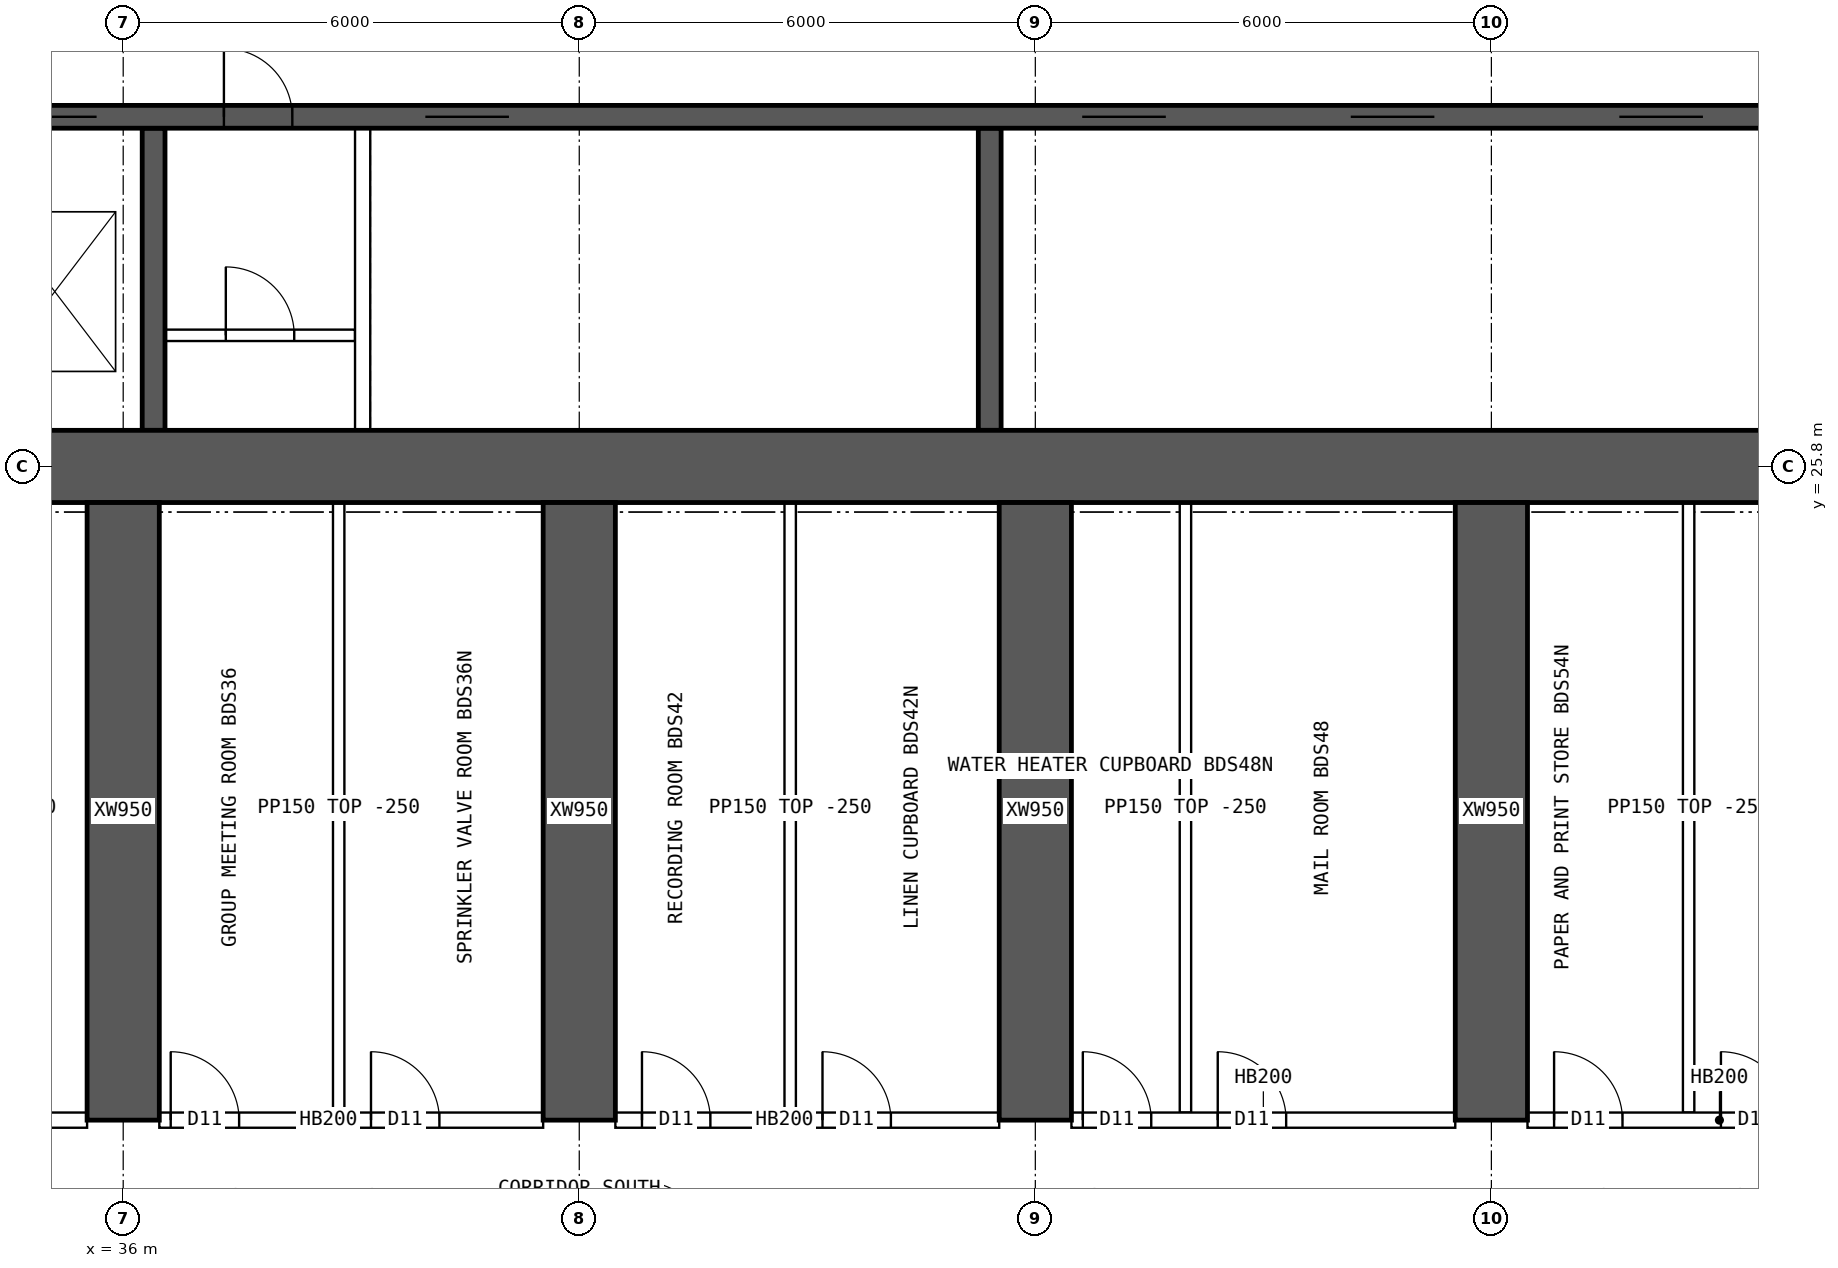
"""IFC4 building model, lengths in metres.
Left out: names, types, materials, properties, quantities, classifications, styles, units other than length and angle.
Written with IfcOpenShell. Run it as: python <this file> out.ifc"""

import sys

from ifc_helpers import new_model, si_unit, direction, frame, frame_2d, origin, place, context, subcontext, project, spatial, rectangle, extrude, element, fill, save


model = new_model("IFC4")
c1 = context("Model", 3, precision=1e-05, world=origin(), true_north=direction((0.0, 1.0)))
c2 = subcontext(c1, "Body", "Model", "MODEL_VIEW")
j1 = project(units=[si_unit("LENGTHUNIT", "METRE"), si_unit("PLANEANGLEUNIT", "RADIAN")], contexts=[c1])
p1 = place(None, origin())
s1 = spatial("IfcSite", under=j1, at=p1, CompositionType="ELEMENT")
p2 = place(p1, origin())
s2 = spatial("IfcBuilding", under=s1, at=p2, CompositionType="ELEMENT")
p3 = place(p2, frame((0.0, 0.0, 140.35)))
s3 = spatial("IfcBuildingStorey", under=s2, at=p3, CompositionType="ELEMENT", Elevation=140.35)
p4 = place(p3, frame((18.0, 25.8, 0.0), z_axis=(0.0, 0.0, 1.0), x_axis=(1.0, 0.0, 0.0)))
e1 = element("IfcWall", 1, at=p4, inside=s3, PredefinedType="SHEAR", context=c2, shape_type="SweptSolid", body=[
    extrude(rectangle(XDim=48.0, YDim=0.95, at=frame_2d((24.0, 0.0))), origin(), (0.0, 0.0, 1.0), 4.5),
])
p5 = place(p3, frame((18.475, 30.4, 0.0), z_axis=(0.0, 0.0, 1.0), x_axis=(1.0, 0.0, 0.0)))
e2 = element("IfcWall", 2, at=p5, inside=s3, PredefinedType="SHEAR", context=c2, shape_type="SweptSolid", body=[
    extrude(rectangle(XDim=47.05, YDim=0.3, at=frame_2d((23.525, 0.0))), origin(), (0.0, 0.0, 1.0), 4.5),
])
p6 = place(p5, frame((0.4, 0.0, 0.0)))
e3 = element("IfcOpeningElement", 3, at=p6, cuts=e2, PredefinedType="OPENING", context=c2, shape_type="SweptSolid", body=[
    extrude(rectangle(XDim=1.0, YDim=2.1, at=frame_2d((0.5, 1.05))), frame((0.0, 0.16, 0.0), z_axis=(0.0, -1.0, 0.0), x_axis=(1.0, 0.0, 0.0)), (0.0, 0.0, 1.0), 0.32),
])
p7 = place(p5, frame((45.65, 0.0, 0.0)))
e4 = element("IfcOpeningElement", 4, at=p7, cuts=e2, PredefinedType="OPENING", context=c2, shape_type="SweptSolid", body=[
    extrude(rectangle(XDim=1.0, YDim=2.1, at=frame_2d((0.5, 1.05))), frame((0.0, 0.16, 0.0), z_axis=(0.0, -1.0, 0.0), x_axis=(1.0, 0.0, 0.0)), (0.0, 0.0, 1.0), 0.32),
])
p8 = place(p5, frame((8.275, 0.0, 0.0)))
e5 = element("IfcOpeningElement", 5, at=p8, cuts=e2, PredefinedType="OPENING", context=c2, shape_type="SweptSolid", body=[
    extrude(rectangle(XDim=1.1, YDim=2.1, at=frame_2d((0.55, 1.05))), frame((0.0, 0.16, 0.0), z_axis=(0.0, -1.0, 0.0), x_axis=(1.0, 0.0, 0.0)), (0.0, 0.0, 1.0), 0.32),
])
p9 = place(p5, frame((10.875, 0.0, 0.0)))
e6 = element("IfcOpeningElement", 6, at=p9, cuts=e2, PredefinedType="OPENING", context=c2, shape_type="SweptSolid", body=[
    extrude(rectangle(XDim=1.1, YDim=2.1, at=frame_2d((0.55, 1.05))), frame((0.0, 0.16, 0.0), z_axis=(0.0, -1.0, 0.0), x_axis=(1.0, 0.0, 0.0)), (0.0, 0.0, 1.0), 0.32),
])
p10 = place(p5, frame((13.475, 0.0, 0.0)))
e7 = element("IfcOpeningElement", 7, at=p10, cuts=e2, PredefinedType="OPENING", context=c2, shape_type="SweptSolid", body=[
    extrude(rectangle(XDim=1.1, YDim=2.1, at=frame_2d((0.55, 1.05))), frame((0.0, 0.16, 0.0), z_axis=(0.0, -1.0, 0.0), x_axis=(1.0, 0.0, 0.0)), (0.0, 0.0, 1.0), 0.32),
])
p11 = place(p5, frame((16.075, 0.0, 0.0)))
e8 = element("IfcOpeningElement", 8, at=p11, cuts=e2, PredefinedType="OPENING", context=c2, shape_type="SweptSolid", body=[
    extrude(rectangle(XDim=1.1, YDim=2.1, at=frame_2d((0.55, 1.05))), frame((0.0, 0.16, 0.0), z_axis=(0.0, -1.0, 0.0), x_axis=(1.0, 0.0, 0.0)), (0.0, 0.0, 1.0), 0.32),
])
p12 = place(p5, frame((18.85, 0.0, 0.0)))
e9 = element("IfcOpeningElement", 9, at=p12, cuts=e2, PredefinedType="OPENING", context=c2, shape_type="SweptSolid", body=[
    extrude(rectangle(XDim=0.9, YDim=2.1, at=frame_2d((0.45, 1.05))), frame((0.0, 0.16, 0.0), z_axis=(0.0, -1.0, 0.0), x_axis=(1.0, 0.0, 0.0)), (0.0, 0.0, 1.0), 0.32),
])
p13 = place(p5, frame((21.5, 0.0, 0.0)))
e10 = element("IfcOpeningElement", 10, at=p13, cuts=e2, PredefinedType="OPENING", context=c2, shape_type="SweptSolid", body=[
    extrude(rectangle(XDim=1.1, YDim=2.1, at=frame_2d((0.55, 1.05))), frame((0.0, 0.16, 0.0), z_axis=(0.0, -1.0, 0.0), x_axis=(1.0, 0.0, 0.0)), (0.0, 0.0, 1.0), 0.32),
])
p14 = place(p5, frame((30.142, 0.0, 0.0)))
e11 = element("IfcOpeningElement", 11, at=p14, cuts=e2, PredefinedType="OPENING", context=c2, shape_type="SweptSolid", body=[
    extrude(rectangle(XDim=1.1, YDim=2.1, at=frame_2d((0.55, 1.05))), frame((0.0, 0.16, 0.0), z_axis=(0.0, -1.0, 0.0), x_axis=(1.0, 0.0, 0.0)), (0.0, 0.0, 1.0), 0.32),
])
p15 = place(p5, frame((33.675, 0.0, 0.0)))
e12 = element("IfcOpeningElement", 12, at=p15, cuts=e2, PredefinedType="OPENING", context=c2, shape_type="SweptSolid", body=[
    extrude(rectangle(XDim=1.1, YDim=2.1, at=frame_2d((0.55, 1.05))), frame((0.0, 0.16, 0.0), z_axis=(0.0, -1.0, 0.0), x_axis=(1.0, 0.0, 0.0)), (0.0, 0.0, 1.0), 0.32),
])
p16 = place(p5, frame((37.208, 0.0, 0.0)))
e13 = element("IfcOpeningElement", 13, at=p16, cuts=e2, PredefinedType="OPENING", context=c2, shape_type="SweptSolid", body=[
    extrude(rectangle(XDim=1.1, YDim=2.1, at=frame_2d((0.55, 1.05))), frame((0.0, 0.16, 0.0), z_axis=(0.0, -1.0, 0.0), x_axis=(1.0, 0.0, 0.0)), (0.0, 0.0, 1.0), 0.32),
])
for number, where, z_axis, x_axis in (
    (14, (36.4, 26.275, 0.0), (0.0, 0.0, 1.0), (0.0, 1.0, 0.0)),
    (15, (47.4, 26.275, 0.0), (0.0, 0.0, 1.0), (0.0, 1.0, 0.0)),
):
    element("IfcWall", number, at=place(p3, frame(where, z_axis=z_axis, x_axis=x_axis)), inside=s3, PredefinedType="SHEAR", context=c2, shape_type="SweptSolid", body=[
        extrude(rectangle(XDim=3.975, YDim=0.3, at=frame_2d((1.988, 0.0))), origin(), (0.0, 0.0, 1.0), 4.5),
    ])
for number, where, z_axis, x_axis in (
    (16, (36.0, 17.2, 0.0), (0.0, 0.0, 1.0), (0.0, 1.0, 0.0)),
    (17, (42.0, 17.2, 0.0), (0.0, 0.0, 1.0), (0.0, 1.0, 0.0)),
    (18, (48.0, 17.2, 0.0), (0.0, 0.0, 1.0), (0.0, 1.0, 0.0)),
    (19, (54.0, 17.2, 0.0), (0.0, 0.0, 1.0), (0.0, 1.0, 0.0)),
):
    element("IfcWall", number, at=place(p3, frame(where, z_axis=z_axis, x_axis=x_axis)), inside=s3, PredefinedType="SHEAR", context=c2, shape_type="SweptSolid", body=[
        extrude(rectangle(XDim=8.125, YDim=0.95, at=frame_2d((4.062, 0.0))), origin(), (0.0, 0.0, 1.0), 4.5),
    ])
p17 = place(p3, frame((36.55, 27.525, 0.0), z_axis=(0.0, 0.0, 1.0), x_axis=(1.0, 0.0, 0.0)))
e20 = element("IfcWall", 20, at=p17, inside=s3, PredefinedType="SOLIDWALL", context=c2, shape_type="SweptSolid", body=[
    extrude(rectangle(XDim=2.5, YDim=0.15, at=frame_2d((1.25, 0.0))), origin(), (0.0, 0.0, 1.0), 4.25),
])
p18 = place(p17, frame((0.8, 0.0, 0.0)))
e21 = element("IfcOpeningElement", 21, at=p18, cuts=e20, PredefinedType="OPENING", context=c2, shape_type="SweptSolid", body=[
    extrude(rectangle(XDim=0.9, YDim=2.1, at=frame_2d((0.45, 1.05))), frame((0.0, 0.085, 0.0), z_axis=(0.0, -1.0, 0.0), x_axis=(1.0, 0.0, 0.0)), (0.0, 0.0, 1.0), 0.17),
])
p19 = place(p3, frame((39.15, 26.275, 0.0), z_axis=(0.0, 0.0, 1.0), x_axis=(0.0, 1.0, 0.0)))
e22 = element("IfcWall", 22, at=p19, inside=s3, PredefinedType="SOLIDWALL", context=c2, shape_type="SweptSolid", body=[
    extrude(rectangle(XDim=3.975, YDim=0.2, at=frame_2d((1.988, 0.0))), origin(), (0.0, 0.0, 1.0), 4.25),
])
p20 = place(p3, frame((30.475, 17.2, 0.0), z_axis=(0.0, 0.0, 1.0), x_axis=(1.0, 0.0, 0.0)))
e23 = element("IfcWall", 23, at=p20, inside=s3, PredefinedType="SOLIDWALL", context=c2, shape_type="SweptSolid", body=[
    extrude(rectangle(XDim=5.05, YDim=0.2, at=frame_2d((2.525, 0.0))), origin(), (0.0, 0.0, 1.0), 4.25),
])
p21 = place(p20, frame((0.8, 0.0, 0.0)))
e24 = element("IfcOpeningElement", 24, at=p21, cuts=e23, PredefinedType="OPENING", context=c2, shape_type="SweptSolid", body=[
    extrude(rectangle(XDim=1.0, YDim=2.1, at=frame_2d((0.5, 1.05))), frame((0.0, 0.11, 0.0), z_axis=(0.0, -1.0, 0.0), x_axis=(1.0, 0.0, 0.0)), (0.0, 0.0, 1.0), 0.22),
])
p22 = place(p3, frame((36.475, 17.2, 0.0), z_axis=(0.0, 0.0, 1.0), x_axis=(1.0, 0.0, 0.0)))
e25 = element("IfcWall", 25, at=p22, inside=s3, PredefinedType="SOLIDWALL", context=c2, shape_type="SweptSolid", body=[
    extrude(rectangle(XDim=5.05, YDim=0.2, at=frame_2d((2.525, 0.0))), origin(), (0.0, 0.0, 1.0), 4.25),
])
p23 = place(p22, frame((0.15, 0.0, 0.0)))
e26 = element("IfcOpeningElement", 26, at=p23, cuts=e25, PredefinedType="OPENING", context=c2, shape_type="SweptSolid", body=[
    extrude(rectangle(XDim=0.9, YDim=2.1, at=frame_2d((0.45, 1.05))), frame((0.0, 0.11, 0.0), z_axis=(0.0, -1.0, 0.0), x_axis=(1.0, 0.0, 0.0)), (0.0, 0.0, 1.0), 0.22),
])
p24 = place(p22, frame((2.785, 0.0, 0.0)))
e27 = element("IfcOpeningElement", 27, at=p24, cuts=e25, PredefinedType="OPENING", context=c2, shape_type="SweptSolid", body=[
    extrude(rectangle(XDim=0.9, YDim=2.1, at=frame_2d((0.45, 1.05))), frame((0.0, 0.11, 0.0), z_axis=(0.0, -1.0, 0.0), x_axis=(1.0, 0.0, 0.0)), (0.0, 0.0, 1.0), 0.22),
])
p25 = place(p3, frame((42.475, 17.2, 0.0), z_axis=(0.0, 0.0, 1.0), x_axis=(1.0, 0.0, 0.0)))
e28 = element("IfcWall", 28, at=p25, inside=s3, PredefinedType="SOLIDWALL", context=c2, shape_type="SweptSolid", body=[
    extrude(rectangle(XDim=5.05, YDim=0.2, at=frame_2d((2.525, 0.0))), origin(), (0.0, 0.0, 1.0), 4.25),
])
p26 = place(p25, frame((0.35, 0.0, 0.0)))
e29 = element("IfcOpeningElement", 29, at=p26, cuts=e28, PredefinedType="OPENING", context=c2, shape_type="SweptSolid", body=[
    extrude(rectangle(XDim=0.9, YDim=2.1, at=frame_2d((0.45, 1.05))), frame((0.0, 0.11, 0.0), z_axis=(0.0, -1.0, 0.0), x_axis=(1.0, 0.0, 0.0)), (0.0, 0.0, 1.0), 0.22),
])
p27 = place(p25, frame((2.725, 0.0, 0.0)))
e30 = element("IfcOpeningElement", 30, at=p27, cuts=e28, PredefinedType="OPENING", context=c2, shape_type="SweptSolid", body=[
    extrude(rectangle(XDim=0.9, YDim=2.1, at=frame_2d((0.45, 1.05))), frame((0.0, 0.11, 0.0), z_axis=(0.0, -1.0, 0.0), x_axis=(1.0, 0.0, 0.0)), (0.0, 0.0, 1.0), 0.22),
])
p28 = place(p3, frame((48.475, 17.2, 0.0), z_axis=(0.0, 0.0, 1.0), x_axis=(1.0, 0.0, 0.0)))
e31 = element("IfcWall", 31, at=p28, inside=s3, PredefinedType="SOLIDWALL", context=c2, shape_type="SweptSolid", body=[
    extrude(rectangle(XDim=5.05, YDim=0.2, at=frame_2d((2.525, 0.0))), origin(), (0.0, 0.0, 1.0), 4.25),
])
p29 = place(p28, frame((0.15, 0.0, 0.0)))
e32 = element("IfcOpeningElement", 32, at=p29, cuts=e31, PredefinedType="OPENING", context=c2, shape_type="SweptSolid", body=[
    extrude(rectangle(XDim=0.9, YDim=2.1, at=frame_2d((0.45, 1.05))), frame((0.0, 0.11, 0.0), z_axis=(0.0, -1.0, 0.0), x_axis=(1.0, 0.0, 0.0)), (0.0, 0.0, 1.0), 0.22),
])
p30 = place(p28, frame((1.925, 0.0, 0.0)))
e33 = element("IfcOpeningElement", 33, at=p30, cuts=e31, PredefinedType="OPENING", context=c2, shape_type="SweptSolid", body=[
    extrude(rectangle(XDim=0.9, YDim=2.1, at=frame_2d((0.45, 1.05))), frame((0.0, 0.11, 0.0), z_axis=(0.0, -1.0, 0.0), x_axis=(1.0, 0.0, 0.0)), (0.0, 0.0, 1.0), 0.22),
])
p31 = place(p3, frame((54.475, 17.2, 0.0), z_axis=(0.0, 0.0, 1.0), x_axis=(1.0, 0.0, 0.0)))
e34 = element("IfcWall", 34, at=p31, inside=s3, PredefinedType="SOLIDWALL", context=c2, shape_type="SweptSolid", body=[
    extrude(rectangle(XDim=5.05, YDim=0.2, at=frame_2d((2.525, 0.0))), origin(), (0.0, 0.0, 1.0), 4.25),
])
p32 = place(p31, frame((0.35, 0.0, 0.0)))
e35 = element("IfcOpeningElement", 35, at=p32, cuts=e34, PredefinedType="OPENING", context=c2, shape_type="SweptSolid", body=[
    extrude(rectangle(XDim=0.9, YDim=2.1, at=frame_2d((0.45, 1.05))), frame((0.0, 0.11, 0.0), z_axis=(0.0, -1.0, 0.0), x_axis=(1.0, 0.0, 0.0)), (0.0, 0.0, 1.0), 0.22),
])
p33 = place(p31, frame((2.545, 0.0, 0.0)))
e36 = element("IfcOpeningElement", 36, at=p33, cuts=e34, PredefinedType="OPENING", context=c2, shape_type="SweptSolid", body=[
    extrude(rectangle(XDim=0.9, YDim=2.1, at=frame_2d((0.45, 1.05))), frame((0.0, 0.11, 0.0), z_axis=(0.0, -1.0, 0.0), x_axis=(1.0, 0.0, 0.0)), (0.0, 0.0, 1.0), 0.22),
])
for number, where, z_axis, x_axis in (
    (37, (38.835, 17.3, 0.0), (0.0, 0.0, 1.0), (0.0, 1.0, 0.0)),
    (38, (44.775, 17.3, 0.0), (0.0, 0.0, 1.0), (0.0, 1.0, 0.0)),
    (39, (49.975, 17.3, 0.0), (0.0, 0.0, 1.0), (0.0, 1.0, 0.0)),
    (40, (56.595, 17.3, 0.0), (0.0, 0.0, 1.0), (0.0, 1.0, 0.0)),
):
    element("IfcWall", number, at=place(p3, frame(where, z_axis=z_axis, x_axis=x_axis)), inside=s3, PredefinedType="PARTITIONING", context=c2, shape_type="SweptSolid", body=[
        extrude(rectangle(XDim=8.025, YDim=0.15, at=frame_2d((4.012, 0.0))), origin(), (0.0, 0.0, 1.0), 4.25),
    ])
p34 = place(p11, origin())
e41 = element("IfcDoor", 41, at=p34, inside=s3, OperationType="DOUBLE_DOOR_SLIDING", PredefinedType="DOOR", context=c2, shape_type="SweptSolid", body=[
    extrude(rectangle(XDim=1.1, YDim=2.1, at=frame_2d((0.55, 1.05))), frame((0.0, 0.025, 0.0), z_axis=(0.0, -1.0, 0.0), x_axis=(1.0, 0.0, 0.0)), (0.0, 0.0, 1.0), 0.05),
])
fill(e8, e41)
p35 = place(p18, origin())
e42 = element("IfcDoor", 42, at=p35, inside=s3, OperationType="SINGLE_SWING_LEFT", PredefinedType="DOOR", context=c2, shape_type="SweptSolid", body=[
    extrude(rectangle(XDim=0.9, YDim=2.1, at=frame_2d((0.45, 1.05))), frame((0.0, 0.025, 0.0), z_axis=(0.0, -1.0, 0.0), x_axis=(1.0, 0.0, 0.0)), (0.0, 0.0, 1.0), 0.05),
])
fill(e21, e42)
p36 = place(p12, origin())
e43 = element("IfcDoor", 43, at=p36, inside=s3, OperationType="SINGLE_SWING_LEFT", PredefinedType="DOOR", context=c2, shape_type="SweptSolid", body=[
    extrude(rectangle(XDim=0.9, YDim=2.1, at=frame_2d((0.45, 1.05))), frame((0.0, 0.025, 0.0), z_axis=(0.0, -1.0, 0.0), x_axis=(1.0, 0.0, 0.0)), (0.0, 0.0, 1.0), 0.05),
])
fill(e9, e43)
p37 = place(p13, origin())
e44 = element("IfcDoor", 44, at=p37, inside=s3, OperationType="DOUBLE_DOOR_SLIDING", PredefinedType="DOOR", context=c2, shape_type="SweptSolid", body=[
    extrude(rectangle(XDim=1.1, YDim=2.1, at=frame_2d((0.55, 1.05))), frame((0.0, 0.025, 0.0), z_axis=(0.0, -1.0, 0.0), x_axis=(1.0, 0.0, 0.0)), (0.0, 0.0, 1.0), 0.05),
])
fill(e10, e44)
p38 = place(p14, origin())
e45 = element("IfcDoor", 45, at=p38, inside=s3, OperationType="DOUBLE_DOOR_SLIDING", PredefinedType="DOOR", context=c2, shape_type="SweptSolid", body=[
    extrude(rectangle(XDim=1.1, YDim=2.1, at=frame_2d((0.55, 1.05))), frame((0.0, 0.025, 0.0), z_axis=(0.0, -1.0, 0.0), x_axis=(1.0, 0.0, 0.0)), (0.0, 0.0, 1.0), 0.05),
])
fill(e11, e45)
p39 = place(p15, origin())
e46 = element("IfcDoor", 46, at=p39, inside=s3, OperationType="DOUBLE_DOOR_SLIDING", PredefinedType="DOOR", context=c2, shape_type="SweptSolid", body=[
    extrude(rectangle(XDim=1.1, YDim=2.1, at=frame_2d((0.55, 1.05))), frame((0.0, 0.025, 0.0), z_axis=(0.0, -1.0, 0.0), x_axis=(1.0, 0.0, 0.0)), (0.0, 0.0, 1.0), 0.05),
])
fill(e12, e46)
p40 = place(p16, origin())
e47 = element("IfcDoor", 47, at=p40, inside=s3, OperationType="DOUBLE_DOOR_SLIDING", PredefinedType="DOOR", context=c2, shape_type="SweptSolid", body=[
    extrude(rectangle(XDim=1.1, YDim=2.1, at=frame_2d((0.55, 1.05))), frame((0.0, 0.025, 0.0), z_axis=(0.0, -1.0, 0.0), x_axis=(1.0, 0.0, 0.0)), (0.0, 0.0, 1.0), 0.05),
])
fill(e13, e47)
p41 = place(p23, origin())
e48 = element("IfcDoor", 48, at=p41, inside=s3, OperationType="SINGLE_SWING_LEFT", PredefinedType="DOOR", context=c2, shape_type="SweptSolid", body=[
    extrude(rectangle(XDim=0.9, YDim=2.1, at=frame_2d((0.45, 1.05))), frame((0.0, 0.025, 0.0), z_axis=(0.0, -1.0, 0.0), x_axis=(1.0, 0.0, 0.0)), (0.0, 0.0, 1.0), 0.05),
])
fill(e26, e48)
p42 = place(p24, origin())
e49 = element("IfcDoor", 49, at=p42, inside=s3, OperationType="SINGLE_SWING_LEFT", PredefinedType="DOOR", context=c2, shape_type="SweptSolid", body=[
    extrude(rectangle(XDim=0.9, YDim=2.1, at=frame_2d((0.45, 1.05))), frame((0.0, 0.025, 0.0), z_axis=(0.0, -1.0, 0.0), x_axis=(1.0, 0.0, 0.0)), (0.0, 0.0, 1.0), 0.05),
])
fill(e27, e49)
p43 = place(p26, origin())
e50 = element("IfcDoor", 50, at=p43, inside=s3, OperationType="SINGLE_SWING_LEFT", PredefinedType="DOOR", context=c2, shape_type="SweptSolid", body=[
    extrude(rectangle(XDim=0.9, YDim=2.1, at=frame_2d((0.45, 1.05))), frame((0.0, 0.025, 0.0), z_axis=(0.0, -1.0, 0.0), x_axis=(1.0, 0.0, 0.0)), (0.0, 0.0, 1.0), 0.05),
])
fill(e29, e50)
p44 = place(p27, origin())
e51 = element("IfcDoor", 51, at=p44, inside=s3, OperationType="SINGLE_SWING_LEFT", PredefinedType="DOOR", context=c2, shape_type="SweptSolid", body=[
    extrude(rectangle(XDim=0.9, YDim=2.1, at=frame_2d((0.45, 1.05))), frame((0.0, 0.025, 0.0), z_axis=(0.0, -1.0, 0.0), x_axis=(1.0, 0.0, 0.0)), (0.0, 0.0, 1.0), 0.05),
])
fill(e30, e51)
p45 = place(p29, origin())
e52 = element("IfcDoor", 52, at=p45, inside=s3, OperationType="SINGLE_SWING_LEFT", PredefinedType="DOOR", context=c2, shape_type="SweptSolid", body=[
    extrude(rectangle(XDim=0.9, YDim=2.1, at=frame_2d((0.45, 1.05))), frame((0.0, 0.025, 0.0), z_axis=(0.0, -1.0, 0.0), x_axis=(1.0, 0.0, 0.0)), (0.0, 0.0, 1.0), 0.05),
])
fill(e32, e52)
p46 = place(p30, origin())
e53 = element("IfcDoor", 53, at=p46, inside=s3, OperationType="SINGLE_SWING_LEFT", PredefinedType="DOOR", context=c2, shape_type="SweptSolid", body=[
    extrude(rectangle(XDim=0.9, YDim=2.1, at=frame_2d((0.45, 1.05))), frame((0.0, 0.025, 0.0), z_axis=(0.0, -1.0, 0.0), x_axis=(1.0, 0.0, 0.0)), (0.0, 0.0, 1.0), 0.05),
])
fill(e33, e53)
p47 = place(p32, origin())
e54 = element("IfcDoor", 54, at=p47, inside=s3, OperationType="SINGLE_SWING_LEFT", PredefinedType="DOOR", context=c2, shape_type="SweptSolid", body=[
    extrude(rectangle(XDim=0.9, YDim=2.1, at=frame_2d((0.45, 1.05))), frame((0.0, 0.025, 0.0), z_axis=(0.0, -1.0, 0.0), x_axis=(1.0, 0.0, 0.0)), (0.0, 0.0, 1.0), 0.05),
])
fill(e35, e54)
p48 = place(p33, origin())
e55 = element("IfcDoor", 55, at=p48, inside=s3, OperationType="SINGLE_SWING_LEFT", PredefinedType="DOOR", context=c2, shape_type="SweptSolid", body=[
    extrude(rectangle(XDim=0.9, YDim=2.1, at=frame_2d((0.45, 1.05))), frame((0.0, 0.025, 0.0), z_axis=(0.0, -1.0, 0.0), x_axis=(1.0, 0.0, 0.0)), (0.0, 0.0, 1.0), 0.05),
])
fill(e36, e55)
save(model, sys.argv[1])
